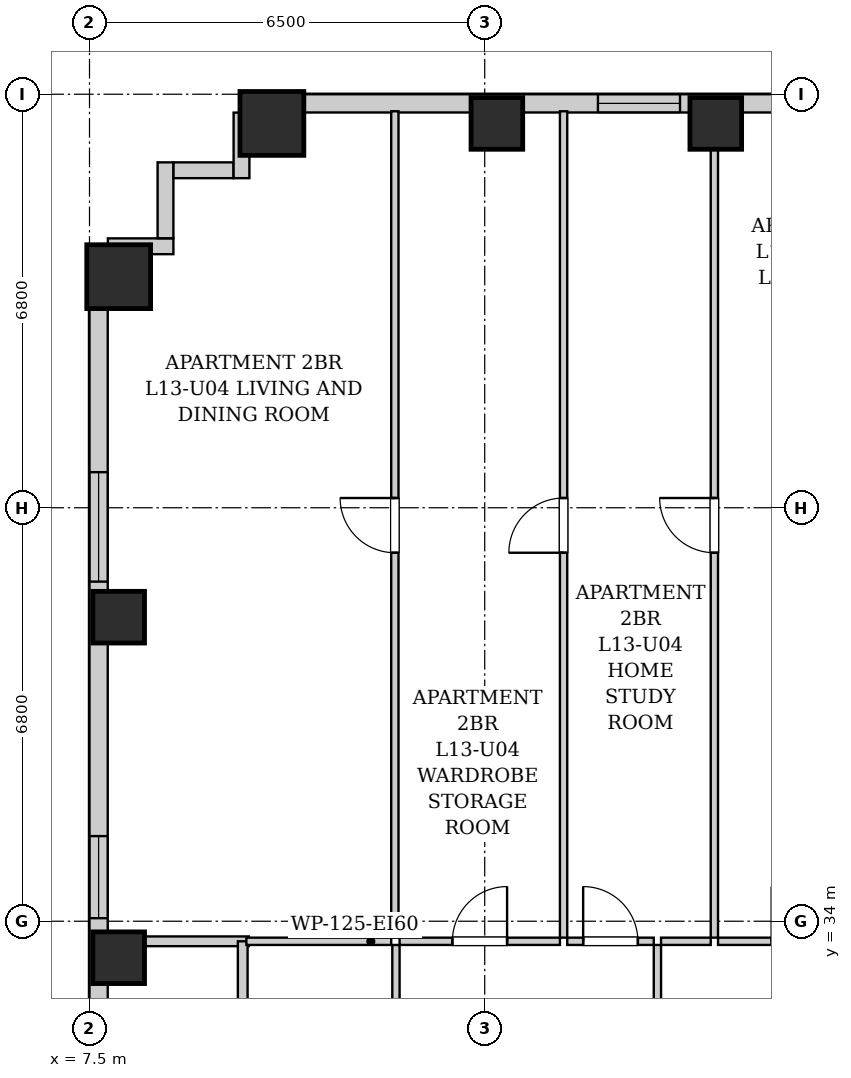
"""IFC4 building model, lengths in metres.
Left out: names, types, materials, properties, quantities, classifications, styles, units other than length and angle.
Written with IfcOpenShell. Run it as: python <this file> out.ifc"""

import sys

from ifc_helpers import new_model, si_unit, direction, frame, frame_2d, origin, origin_2d, place, context, subcontext, project, spatial, rectangle, extrude, element, fill, save


model = new_model("IFC4")
c1 = context("Model", 3, precision=1e-05, world=origin(), true_north=direction((0.0, 1.0)))
c2 = subcontext(c1, "Body", "Model", "MODEL_VIEW")
j1 = project(units=[si_unit("LENGTHUNIT", "METRE"), si_unit("PLANEANGLEUNIT", "RADIAN")], contexts=[c1])
p1 = place(None, origin())
s1 = spatial("IfcSite", under=j1, at=p1, CompositionType="ELEMENT")
p2 = place(p1, origin())
s2 = spatial("IfcBuilding", under=s1, at=p2, CompositionType="ELEMENT")
p3 = place(p2, frame((0.0, 0.0, 51.4)))
s3 = spatial("IfcBuildingStorey", under=s2, at=p3, CompositionType="ELEMENT", Elevation=51.4)
p4 = place(p3, frame((10.5, 47.12, 0.0), z_axis=(0.0, 0.0, 1.0), x_axis=(1.0, 0.0, 0.0)))
e1 = element("IfcColumn", 1, at=p4, inside=s3, PredefinedType="COLUMN", context=c2, shape_type="SweptSolid", body=[
    extrude(rectangle(XDim=1.05, YDim=1.05, at=origin_2d()), origin(), (0.0, 0.0, 1.0), 3.2),
])
for number, where, z_axis, x_axis in (
    (2, (14.2, 47.12, 0.0), (0.0, 0.0, 1.0), (1.0, 0.0, 0.0)),
    (3, (17.8, 47.12, 0.0), (0.0, 0.0, 1.0), (1.0, 0.0, 0.0)),
    (4, (7.98, 33.4, 0.0), (0.0, 0.0, 1.0), (1.0, 0.0, 0.0)),
    (5, (7.98, 39.0, 0.0), (0.0, 0.0, 1.0), (1.0, 0.0, 0.0)),
):
    element("IfcColumn", number, at=place(p3, frame(where, z_axis=z_axis, x_axis=x_axis)), inside=s3, PredefinedType="COLUMN", context=c2, shape_type="SweptSolid", body=[
        extrude(rectangle(XDim=0.85, YDim=0.85, at=origin_2d()), origin(), (0.0, 0.0, 1.0), 3.2),
    ])
p5 = place(p3, frame((7.98, 44.6, 0.0), z_axis=(0.0, 0.0, 1.0), x_axis=(1.0, 0.0, 0.0)))
e6 = element("IfcColumn", 6, at=p5, inside=s3, PredefinedType="COLUMN", context=c2, shape_type="SweptSolid", body=[
    extrude(rectangle(XDim=1.05, YDim=1.05, at=origin_2d()), origin(), (0.0, 0.0, 1.0), 3.2),
])
p6 = place(p3, frame((10.0, 47.45, 0.0), z_axis=(0.0, 0.0, 1.0), x_axis=(1.0, 0.0, 0.0)))
e7 = element("IfcWall", 7, at=p6, inside=s3, PredefinedType="SOLIDWALL", context=c2, shape_type="SweptSolid", body=[
    extrude(rectangle(XDim=26.15, YDim=0.3, at=frame_2d((13.075, 0.0))), origin(), (0.0, 0.0, 1.0), 1.975),
])
p7 = place(p6, frame((5.862, 0.0, 0.55)))
e8 = element("IfcOpeningElement", 8, at=p7, cuts=e7, PredefinedType="OPENING", context=c2, shape_type="SweptSolid", body=[
    extrude(rectangle(XDim=1.35, YDim=1.2, at=frame_2d((0.675, 0.6))), frame((0.0, 0.16, 0.0), z_axis=(0.0, -1.0, 0.0), x_axis=(1.0, 0.0, 0.0)), (0.0, 0.0, 1.0), 0.32),
])
p8 = place(p6, frame((8.944, 0.0, 0.55)))
e9 = element("IfcOpeningElement", 9, at=p8, cuts=e7, PredefinedType="OPENING", context=c2, shape_type="SweptSolid", body=[
    extrude(rectangle(XDim=1.8, YDim=1.2, at=frame_2d((0.9, 0.6))), frame((0.0, 0.16, 0.0), z_axis=(0.0, -1.0, 0.0), x_axis=(1.0, 0.0, 0.0)), (0.0, 0.0, 1.0), 0.32),
])
p9 = place(p6, frame((18.788, 0.0, 0.55)))
e10 = element("IfcOpeningElement", 10, at=p9, cuts=e7, PredefinedType="OPENING", context=c2, shape_type="SweptSolid", body=[
    extrude(rectangle(XDim=1.8, YDim=1.2, at=frame_2d((0.9, 0.6))), frame((0.0, 0.16, 0.0), z_axis=(0.0, -1.0, 0.0), x_axis=(1.0, 0.0, 0.0)), (0.0, 0.0, 1.0), 0.32),
])
p10 = place(p6, frame((21.265, 0.0, 0.55)))
e11 = element("IfcOpeningElement", 11, at=p10, cuts=e7, PredefinedType="OPENING", context=c2, shape_type="SweptSolid", body=[
    extrude(rectangle(XDim=1.35, YDim=1.2, at=frame_2d((0.675, 0.6))), frame((0.0, 0.16, 0.0), z_axis=(0.0, -1.0, 0.0), x_axis=(1.0, 0.0, 0.0)), (0.0, 0.0, 1.0), 0.32),
])
p11 = place(p6, frame((23.785, 0.0, 0.55)))
e12 = element("IfcOpeningElement", 12, at=p11, cuts=e7, PredefinedType="OPENING", context=c2, shape_type="SweptSolid", body=[
    extrude(rectangle(XDim=1.8, YDim=1.2, at=frame_2d((0.9, 0.6))), frame((0.0, 0.16, 0.0), z_axis=(0.0, -1.0, 0.0), x_axis=(1.0, 0.0, 0.0)), (0.0, 0.0, 1.0), 0.32),
])
p12 = place(p3, frame((7.65, 2.5, 0.0), z_axis=(0.0, 0.0, 1.0), x_axis=(0.0, 1.0, 0.0)))
e13 = element("IfcWall", 13, at=p12, inside=s3, PredefinedType="SOLIDWALL", context=c2, shape_type="SweptSolid", body=[
    extrude(rectangle(XDim=42.6, YDim=0.3, at=frame_2d((21.3, 0.0))), origin(), (0.0, 0.0, 1.0), 1.975),
])
p13 = place(p12, frame((3.15, 0.0, 0.55)))
e14 = element("IfcOpeningElement", 14, at=p13, cuts=e13, PredefinedType="OPENING", context=c2, shape_type="SweptSolid", body=[
    extrude(rectangle(XDim=1.8, YDim=1.2, at=frame_2d((0.9, 0.6))), frame((0.0, 0.16, 0.0), z_axis=(0.0, -1.0, 0.0), x_axis=(1.0, 0.0, 0.0)), (0.0, 0.0, 1.0), 0.32),
])
p14 = place(p12, frame((1.185, 0.0, 0.55)))
e15 = element("IfcOpeningElement", 15, at=p14, cuts=e13, PredefinedType="OPENING", context=c2, shape_type="SweptSolid", body=[
    extrude(rectangle(XDim=1.35, YDim=1.2, at=frame_2d((0.675, 0.6))), frame((0.0, 0.16, 0.0), z_axis=(0.0, -1.0, 0.0), x_axis=(1.0, 0.0, 0.0)), (0.0, 0.0, 1.0), 0.32),
])
p15 = place(p12, frame((37.085, 0.0, 0.55)))
e16 = element("IfcOpeningElement", 16, at=p15, cuts=e13, PredefinedType="OPENING", context=c2, shape_type="SweptSolid", body=[
    extrude(rectangle(XDim=1.8, YDim=1.2, at=frame_2d((0.9, 0.6))), frame((0.0, 0.16, 0.0), z_axis=(0.0, -1.0, 0.0), x_axis=(1.0, 0.0, 0.0)), (0.0, 0.0, 1.0), 0.32),
])
p16 = place(p12, frame((31.55, 0.0, 0.55)))
e17 = element("IfcOpeningElement", 17, at=p16, cuts=e13, PredefinedType="OPENING", context=c2, shape_type="SweptSolid", body=[
    extrude(rectangle(XDim=1.35, YDim=1.2, at=frame_2d((0.675, 0.6))), frame((0.0, 0.16, 0.0), z_axis=(0.0, -1.0, 0.0), x_axis=(1.0, 0.0, 0.0)), (0.0, 0.0, 1.0), 0.32),
])
p17 = place(p12, frame((13.95, 0.0, 0.55)))
e18 = element("IfcOpeningElement", 18, at=p17, cuts=e13, PredefinedType="OPENING", context=c2, shape_type="SweptSolid", body=[
    extrude(rectangle(XDim=1.8, YDim=1.2, at=frame_2d((0.9, 0.6))), frame((0.0, 0.16, 0.0), z_axis=(0.0, -1.0, 0.0), x_axis=(1.0, 0.0, 0.0)), (0.0, 0.0, 1.0), 0.32),
])
p18 = place(p12, frame((23.325, 0.0, 0.55)))
e19 = element("IfcOpeningElement", 19, at=p18, cuts=e13, PredefinedType="OPENING", context=c2, shape_type="SweptSolid", body=[
    extrude(rectangle(XDim=1.8, YDim=1.2, at=frame_2d((0.9, 0.6))), frame((0.0, 0.16, 0.0), z_axis=(0.0, -1.0, 0.0), x_axis=(1.0, 0.0, 0.0)), (0.0, 0.0, 1.0), 0.32),
])
p19 = place(p3, frame((7.802, 45.1, 0.0), z_axis=(0.0, 0.0, 1.0), x_axis=(1.0, 0.0, 0.0)))
e20 = element("IfcWall", 20, at=p19, inside=s3, PredefinedType="SOLIDWALL", context=c2, shape_type="SweptSolid", body=[
    extrude(rectangle(XDim=1.078, YDim=0.26, at=frame_2d((0.539, 0.0))), origin(), (0.0, 0.0, 1.0), 2.94),
])
p20 = place(p3, frame((8.75, 45.232, 0.0), z_axis=(0.0, 0.0, 1.0), x_axis=(0.0, 1.0, 0.0)))
e21 = element("IfcWall", 21, at=p20, inside=s3, PredefinedType="SOLIDWALL", context=c2, shape_type="SweptSolid", body=[
    extrude(rectangle(XDim=1.248, YDim=0.26, at=frame_2d((0.624, 0.0))), origin(), (0.0, 0.0, 1.0), 2.94),
])
p21 = place(p3, frame((8.882, 46.35, 0.0), z_axis=(0.0, 0.0, 1.0), x_axis=(1.0, 0.0, 0.0)))
e22 = element("IfcWall", 22, at=p21, inside=s3, PredefinedType="SOLIDWALL", context=c2, shape_type="SweptSolid", body=[
    extrude(rectangle(XDim=0.986, YDim=0.26, at=frame_2d((0.493, 0.0))), origin(), (0.0, 0.0, 1.0), 2.94),
])
p22 = place(p3, frame((10.0, 46.22, 0.0), z_axis=(0.0, 0.0, 1.0), x_axis=(0.0, 1.0, 0.0)))
e23 = element("IfcWall", 23, at=p22, inside=s3, PredefinedType="SOLIDWALL", context=c2, shape_type="SweptSolid", body=[
    extrude(rectangle(XDim=1.078, YDim=0.26, at=frame_2d((0.539, 0.0))), origin(), (0.0, 0.0, 1.0), 2.94),
])
p23 = place(p3, frame((7.78, 33.67, 0.0), z_axis=(0.0, 0.0, 1.0), x_axis=(1.0, 0.0, 0.0)))
e24 = element("IfcWall", 24, at=p23, inside=s3, PredefinedType="PARTITIONING", context=c2, shape_type="SweptSolid", body=[
    extrude(rectangle(XDim=2.34, YDim=0.16, at=frame_2d((1.17, 0.0))), origin(), (0.0, 0.0, 1.0), 2.94),
])
p24 = place(p3, frame((10.02, 30.76, 0.0), z_axis=(0.0, 0.0, 1.0), x_axis=(0.0, 1.0, 0.0)))
e25 = element("IfcWall", 25, at=p24, inside=s3, PredefinedType="PARTITIONING", context=c2, shape_type="SweptSolid", body=[
    extrude(rectangle(XDim=2.91, YDim=0.16, at=frame_2d((1.455, 0.0))), origin(), (0.0, 0.0, 1.0), 2.94),
])
p25 = place(p3, frame((12.54, 30.76, 0.0), z_axis=(0.0, 0.0, 1.0), x_axis=(0.0, 1.0, 0.0)))
e26 = element("IfcWall", 26, at=p25, inside=s3, PredefinedType="PARTITIONING", context=c2, shape_type="SweptSolid", body=[
    extrude(rectangle(XDim=2.85, YDim=0.12, at=frame_2d((1.425, 0.0))), origin(), (0.0, 0.0, 1.0), 2.94),
])
p26 = place(p25, frame((0.995, 0.0, 0.0)))
e27 = element("IfcOpeningElement", 27, at=p26, cuts=e26, PredefinedType="OPENING", context=c2, shape_type="SweptSolid", body=[
    extrude(rectangle(XDim=0.86, YDim=2.05, at=frame_2d((0.43, 1.025))), frame((0.0, 0.07, 0.0), z_axis=(0.0, -1.0, 0.0), x_axis=(1.0, 0.0, 0.0)), (0.0, 0.0, 1.0), 0.14),
])
p27 = place(p3, frame((10.08, 33.67, 0.0), z_axis=(0.0, 0.0, 1.0), x_axis=(1.0, 0.0, 0.0)))
e28 = element("IfcWall", 28, at=p27, inside=s3, PredefinedType="PARTITIONING", context=c2, shape_type="SweptSolid", body=[
    extrude(rectangle(XDim=2.382, YDim=0.12, at=frame_2d((1.191, 0.0))), origin(), (0.0, 0.0, 1.0), 2.94),
])
p28 = place(p3, frame((16.84, 30.76, 0.0), z_axis=(0.0, 0.0, 1.0), x_axis=(0.0, 1.0, 0.0)))
e29 = element("IfcWall", 29, at=p28, inside=s3, PredefinedType="PARTITIONING", context=c2, shape_type="SweptSolid", body=[
    extrude(rectangle(XDim=2.85, YDim=0.12, at=frame_2d((1.425, 0.0))), origin(), (0.0, 0.0, 1.0), 2.94),
])
p29 = place(p28, frame((0.975, 0.0, 0.0)))
e30 = element("IfcOpeningElement", 30, at=p29, cuts=e29, PredefinedType="OPENING", context=c2, shape_type="SweptSolid", body=[
    extrude(rectangle(XDim=0.9, YDim=2.05, at=frame_2d((0.45, 1.025))), frame((0.0, 0.07, 0.0), z_axis=(0.0, -1.0, 0.0), x_axis=(1.0, 0.0, 0.0)), (0.0, 0.0, 1.0), 0.14),
])
p30 = place(p3, frame((12.6, 33.67, 0.0), z_axis=(0.0, 0.0, 1.0), x_axis=(1.0, 0.0, 0.0)))
e31 = element("IfcWall", 31, at=p30, inside=s3, PredefinedType="PARTITIONING", context=c2, shape_type="SweptSolid", body=[
    extrude(rectangle(XDim=2.637, YDim=0.12, at=frame_2d((1.318, 0.0))), origin(), (0.0, 0.0, 1.0), 2.94),
])
p31 = place(p30, frame((0.868, 0.0, 0.0)))
e32 = element("IfcOpeningElement", 32, at=p31, cuts=e31, PredefinedType="OPENING", context=c2, shape_type="SweptSolid", body=[
    extrude(rectangle(XDim=0.9, YDim=2.05, at=frame_2d((0.45, 1.025))), frame((0.0, 0.07, 0.0), z_axis=(0.0, -1.0, 0.0), x_axis=(1.0, 0.0, 0.0)), (0.0, 0.0, 1.0), 0.14),
])
p32 = place(p3, frame((15.357, 33.67, 0.0), z_axis=(0.0, 0.0, 1.0), x_axis=(1.0, 0.0, 0.0)))
e33 = element("IfcWall", 33, at=p32, inside=s3, PredefinedType="PARTITIONING", context=c2, shape_type="SweptSolid", body=[
    extrude(rectangle(XDim=1.423, YDim=0.12, at=frame_2d((0.711, 0.0))), origin(), (0.0, 0.0, 1.0), 2.94),
])
p33 = place(p32, frame((0.262, 0.0, 0.0)))
e34 = element("IfcOpeningElement", 34, at=p33, cuts=e33, PredefinedType="OPENING", context=c2, shape_type="SweptSolid", body=[
    extrude(rectangle(XDim=0.9, YDim=2.05, at=frame_2d((0.45, 1.025))), frame((0.0, 0.07, 0.0), z_axis=(0.0, -1.0, 0.0), x_axis=(1.0, 0.0, 0.0)), (0.0, 0.0, 1.0), 0.14),
])
p34 = place(p3, frame((16.9, 33.67, 0.0), z_axis=(0.0, 0.0, 1.0), x_axis=(1.0, 0.0, 0.0)))
e35 = element("IfcWall", 35, at=p34, inside=s3, PredefinedType="PARTITIONING", context=c2, shape_type="SweptSolid", body=[
    extrude(rectangle(XDim=0.817, YDim=0.12, at=frame_2d((0.409, 0.0))), origin(), (0.0, 0.0, 1.0), 2.94),
])
p35 = place(p3, frame((17.837, 33.67, 0.0), z_axis=(0.0, 0.0, 1.0), x_axis=(1.0, 0.0, 0.0)))
e36 = element("IfcWall", 36, at=p35, inside=s3, PredefinedType="PARTITIONING", context=c2, shape_type="SweptSolid", body=[
    extrude(rectangle(XDim=2.663, YDim=0.12, at=frame_2d((1.332, 0.0))), origin(), (0.0, 0.0, 1.0), 2.94),
])
p36 = place(p35, frame((0.882, 0.0, 0.0)))
e37 = element("IfcOpeningElement", 37, at=p36, cuts=e36, PredefinedType="OPENING", context=c2, shape_type="SweptSolid", body=[
    extrude(rectangle(XDim=0.9, YDim=2.05, at=frame_2d((0.45, 1.025))), frame((0.0, 0.07, 0.0), z_axis=(0.0, -1.0, 0.0), x_axis=(1.0, 0.0, 0.0)), (0.0, 0.0, 1.0), 0.14),
])
p37 = place(p3, frame((12.522, 33.73, 0.0), z_axis=(0.0, 0.0, 1.0), x_axis=(0.0, 1.0, 0.0)))
e38 = element("IfcWall", 38, at=p37, inside=s3, PredefinedType="PARTITIONING", context=c2, shape_type="SweptSolid", body=[
    extrude(rectangle(XDim=13.59, YDim=0.12, at=frame_2d((6.795, 0.0))), origin(), (0.0, 0.0, 1.0), 2.94),
])
p38 = place(p37, frame((6.33, 0.0, 0.0)))
e39 = element("IfcOpeningElement", 39, at=p38, cuts=e38, PredefinedType="OPENING", context=c2, shape_type="SweptSolid", body=[
    extrude(rectangle(XDim=0.9, YDim=2.05, at=frame_2d((0.45, 1.025))), frame((0.0, 0.07, 0.0), z_axis=(0.0, -1.0, 0.0), x_axis=(1.0, 0.0, 0.0)), (0.0, 0.0, 1.0), 0.14),
])
p39 = place(p3, frame((15.297, 33.73, 0.0), z_axis=(0.0, 0.0, 1.0), x_axis=(0.0, 1.0, 0.0)))
e40 = element("IfcWall", 40, at=p39, inside=s3, PredefinedType="PARTITIONING", context=c2, shape_type="SweptSolid", body=[
    extrude(rectangle(XDim=13.59, YDim=0.12, at=frame_2d((6.795, 0.0))), origin(), (0.0, 0.0, 1.0), 2.94),
])
p40 = place(p39, frame((6.33, 0.0, 0.0)))
e41 = element("IfcOpeningElement", 41, at=p40, cuts=e40, PredefinedType="OPENING", context=c2, shape_type="SweptSolid", body=[
    extrude(rectangle(XDim=0.9, YDim=2.05, at=frame_2d((0.45, 1.025))), frame((0.0, 0.07, 0.0), z_axis=(0.0, -1.0, 0.0), x_axis=(1.0, 0.0, 0.0)), (0.0, 0.0, 1.0), 0.14),
])
p41 = place(p3, frame((17.777, 33.73, 0.0), z_axis=(0.0, 0.0, 1.0), x_axis=(0.0, 1.0, 0.0)))
e42 = element("IfcWall", 42, at=p41, inside=s3, PredefinedType="PARTITIONING", context=c2, shape_type="SweptSolid", body=[
    extrude(rectangle(XDim=13.59, YDim=0.12, at=frame_2d((6.795, 0.0))), origin(), (0.0, 0.0, 1.0), 2.232),
])
p42 = place(p41, frame((6.33, 0.0, 0.0)))
e43 = element("IfcOpeningElement", 43, at=p42, cuts=e42, PredefinedType="OPENING", context=c2, shape_type="SweptSolid", body=[
    extrude(rectangle(XDim=0.9, YDim=2.05, at=frame_2d((0.45, 1.025))), frame((0.0, 0.07, 0.0), z_axis=(0.0, -1.0, 0.0), x_axis=(1.0, 0.0, 0.0)), (0.0, 0.0, 1.0), 0.14),
])
p43 = place(p31, origin())
e44 = element("IfcDoor", 44, at=p43, inside=s3, OperationType="SINGLE_SWING_RIGHT", PredefinedType="DOOR", context=c2, shape_type="SweptSolid", body=[
    extrude(rectangle(XDim=0.9, YDim=2.05, at=frame_2d((0.45, 1.025))), frame((0.0, 0.025, 0.0), z_axis=(0.0, -1.0, 0.0), x_axis=(1.0, 0.0, 0.0)), (0.0, 0.0, 1.0), 0.05),
])
fill(e32, e44)
p44 = place(p33, origin())
e45 = element("IfcDoor", 45, at=p44, inside=s3, OperationType="SINGLE_SWING_LEFT", PredefinedType="DOOR", context=c2, shape_type="SweptSolid", body=[
    extrude(rectangle(XDim=0.9, YDim=2.05, at=frame_2d((0.45, 1.025))), frame((0.0, 0.025, 0.0), z_axis=(0.0, -1.0, 0.0), x_axis=(1.0, 0.0, 0.0)), (0.0, 0.0, 1.0), 0.05),
])
fill(e34, e45)
p45 = place(p38, origin())
e46 = element("IfcDoor", 46, at=p45, inside=s3, OperationType="SINGLE_SWING_RIGHT", PredefinedType="DOOR", context=c2, shape_type="SweptSolid", body=[
    extrude(rectangle(XDim=0.9, YDim=2.05, at=frame_2d((0.45, 1.025))), frame((0.0, 0.025, 0.0), z_axis=(0.0, -1.0, 0.0), x_axis=(1.0, 0.0, 0.0)), (0.0, 0.0, 1.0), 0.05),
])
fill(e39, e46)
p46 = place(p40, origin())
e47 = element("IfcDoor", 47, at=p46, inside=s3, OperationType="SINGLE_SWING_LEFT", PredefinedType="DOOR", context=c2, shape_type="SweptSolid", body=[
    extrude(rectangle(XDim=0.9, YDim=2.05, at=frame_2d((0.45, 1.025))), frame((0.0, 0.025, 0.0), z_axis=(0.0, -1.0, 0.0), x_axis=(1.0, 0.0, 0.0)), (0.0, 0.0, 1.0), 0.05),
])
fill(e41, e47)
p47 = place(p42, origin())
e48 = element("IfcDoor", 48, at=p47, inside=s3, OperationType="SINGLE_SWING_RIGHT", PredefinedType="DOOR", context=c2, shape_type="SweptSolid", body=[
    extrude(rectangle(XDim=0.9, YDim=2.05, at=frame_2d((0.45, 1.025))), frame((0.0, 0.025, 0.0), z_axis=(0.0, -1.0, 0.0), x_axis=(1.0, 0.0, 0.0)), (0.0, 0.0, 1.0), 0.05),
])
fill(e43, e48)
p48 = place(p15, origin())
e49 = element("IfcWindow", 49, at=p48, inside=s3, PartitioningType="DOUBLE_PANEL_VERTICAL", PredefinedType="WINDOW", context=c2, shape_type="SweptSolid", body=[
    extrude(rectangle(XDim=1.8, YDim=1.2, at=frame_2d((0.9, 0.6))), frame((0.0, 0.03, 0.0), z_axis=(0.0, -1.0, 0.0), x_axis=(1.0, 0.0, 0.0)), (0.0, 0.0, 1.0), 0.06),
])
fill(e16, e49)
p49 = place(p16, origin())
e50 = element("IfcWindow", 50, at=p49, inside=s3, PartitioningType="SINGLE_PANEL", PredefinedType="WINDOW", context=c2, shape_type="SweptSolid", body=[
    extrude(rectangle(XDim=1.35, YDim=1.2, at=frame_2d((0.675, 0.6))), frame((0.0, 0.03, 0.0), z_axis=(0.0, -1.0, 0.0), x_axis=(1.0, 0.0, 0.0)), (0.0, 0.0, 1.0), 0.06),
])
fill(e17, e50)
p50 = place(p7, origin())
e51 = element("IfcWindow", 51, at=p50, inside=s3, PartitioningType="SINGLE_PANEL", PredefinedType="WINDOW", context=c2, shape_type="SweptSolid", body=[
    extrude(rectangle(XDim=1.35, YDim=1.2, at=frame_2d((0.675, 0.6))), frame((0.0, 0.03, 0.0), z_axis=(0.0, -1.0, 0.0), x_axis=(1.0, 0.0, 0.0)), (0.0, 0.0, 1.0), 0.06),
])
fill(e8, e51)
save(model, sys.argv[1])
